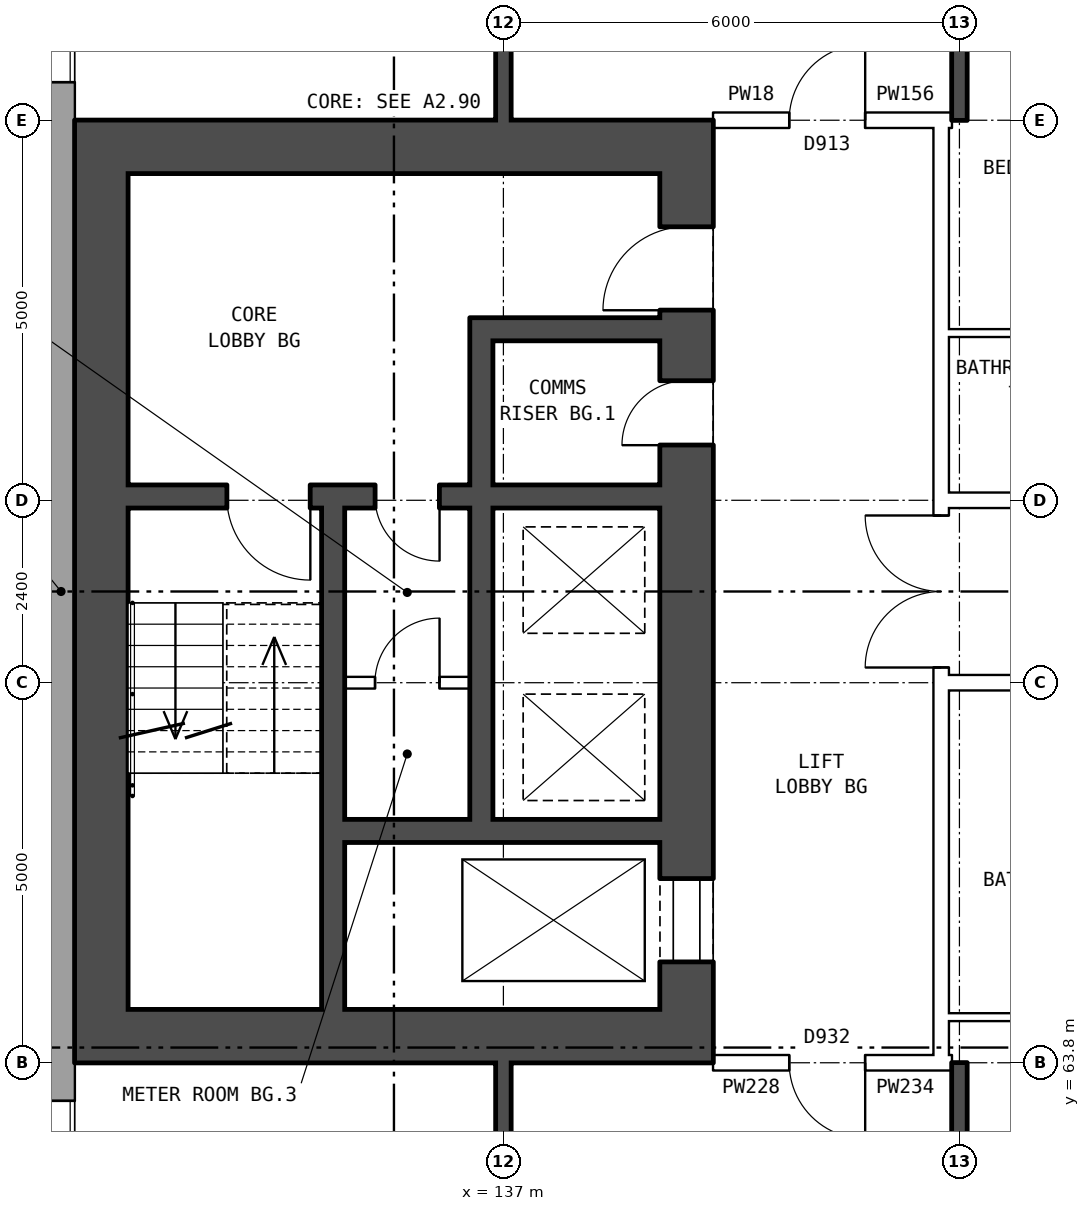
"""IFC4 building model, lengths in metres.
Left out: names, types, materials, properties, quantities, classifications, styles, units other than length and angle.
Written with IfcOpenShell. Run it as: python <this file> out.ifc"""

import sys

from ifc_helpers import new_model, si_unit, direction, frame, frame_2d, origin, place, context, subcontext, project, spatial, rectangle, extrude, element, fill, save


model = new_model("IFC4")
c1 = context("Model", 3, precision=1e-05, world=origin(), true_north=direction((0.0, 1.0)))
c2 = subcontext(c1, "Body", "Model", "MODEL_VIEW")
j1 = project(units=[si_unit("LENGTHUNIT", "METRE"), si_unit("PLANEANGLEUNIT", "RADIAN")], contexts=[c1])
p1 = place(None, origin())
s1 = spatial("IfcSite", under=j1, at=p1, CompositionType="ELEMENT")
p2 = place(p1, origin())
s2 = spatial("IfcBuilding", under=s1, at=p2, CompositionType="ELEMENT")
p3 = place(p2, frame((0.0, 0.0, 74.7)))
s3 = spatial("IfcBuildingStorey", under=s2, at=p3, CompositionType="ELEMENT", Elevation=74.7)
p4 = place(p3, frame((131.18, 82.925, 0.0), z_axis=(0.0, 0.0, 1.0), x_axis=(0.0, -1.0, 0.0)))
e1 = element("IfcWall", 1, at=p4, inside=s3, PredefinedType="STANDARD", context=c2, shape_type="SweptSolid", body=[
    extrude(rectangle(XDim=25.851, YDim=0.36, at=frame_2d((12.925, 0.0))), origin(), (0.0, 0.0, 1.0), 2.85),
])
p5 = place(p4, frame((1.625, 0.0, 0.8)))
e2 = element("IfcOpeningElement", 2, at=p5, cuts=e1, PredefinedType="OPENING", context=c2, shape_type="SweptSolid", body=[
    extrude(rectangle(XDim=1.6, YDim=1.8, at=frame_2d((0.8, 0.9))), frame((0.0, 0.19, 0.0), z_axis=(0.0, -1.0, 0.0), x_axis=(1.0, 0.0, 0.0)), (0.0, 0.0, 1.0), 0.38),
])
p6 = place(p4, frame((4.625, 0.0, 0.8)))
e3 = element("IfcOpeningElement", 3, at=p6, cuts=e1, PredefinedType="OPENING", context=c2, shape_type="SweptSolid", body=[
    extrude(rectangle(XDim=1.6, YDim=1.8, at=frame_2d((0.8, 0.9))), frame((0.0, 0.19, 0.0), z_axis=(0.0, -1.0, 0.0), x_axis=(1.0, 0.0, 0.0)), (0.0, 0.0, 1.0), 0.38),
])
p7 = place(p4, frame((19.625, 0.0, 0.8)))
e4 = element("IfcOpeningElement", 4, at=p7, cuts=e1, PredefinedType="OPENING", context=c2, shape_type="SweptSolid", body=[
    extrude(rectangle(XDim=1.6, YDim=1.8, at=frame_2d((0.8, 0.9))), frame((0.0, 0.19, 0.0), z_axis=(0.0, -1.0, 0.0), x_axis=(1.0, 0.0, 0.0)), (0.0, 0.0, 1.0), 0.38),
])
p8 = place(p4, frame((22.625, 0.0, 0.8)))
e5 = element("IfcOpeningElement", 5, at=p8, cuts=e1, PredefinedType="OPENING", context=c2, shape_type="SweptSolid", body=[
    extrude(rectangle(XDim=1.6, YDim=1.8, at=frame_2d((0.8, 0.9))), frame((0.0, 0.19, 0.0), z_axis=(0.0, -1.0, 0.0), x_axis=(1.0, 0.0, 0.0)), (0.0, 0.0, 1.0), 0.38),
])
p9 = place(p3, frame((139.41, 64.5, 0.0), z_axis=(0.0, 0.0, 1.0), x_axis=(0.0, 1.0, 0.0)))
e6 = element("IfcWall", 6, at=p9, inside=s3, PredefinedType="SHEAR", context=c2, shape_type="SweptSolid", body=[
    extrude(rectangle(XDim=11.0, YDim=0.7, at=frame_2d((5.5, 0.0))), origin(), (0.0, 0.0, 1.0), 2.85),
])
p10 = place(p9, frame((0.625, 0.0, 0.0)))
e7 = element("IfcOpeningElement", 7, at=p10, cuts=e6, PredefinedType="OPENING", context=c2, shape_type="SweptSolid", body=[
    extrude(rectangle(XDim=1.1, YDim=2.1, at=frame_2d((0.55, 1.05))), frame((0.0, 0.36, 0.0), z_axis=(0.0, -1.0, 0.0), x_axis=(1.0, 0.0, 0.0)), (0.0, 0.0, 1.0), 0.72),
])
p11 = place(p9, frame((9.2, 0.0, 0.0)))
e8 = element("IfcOpeningElement", 8, at=p11, cuts=e6, PredefinedType="OPENING", context=c2, shape_type="SweptSolid", body=[
    extrude(rectangle(XDim=1.1, YDim=2.1, at=frame_2d((0.55, 1.05))), frame((0.0, 0.36, 0.0), z_axis=(0.0, -1.0, 0.0), x_axis=(1.0, 0.0, 0.0)), (0.0, 0.0, 1.0), 0.72),
])
p12 = place(p9, frame((7.425, 0.0, 0.0)))
e9 = element("IfcOpeningElement", 9, at=p12, cuts=e6, PredefinedType="OPENING", context=c2, shape_type="SweptSolid", body=[
    extrude(rectangle(XDim=0.85, YDim=2.1, at=frame_2d((0.425, 1.05))), frame((0.0, 0.36, 0.0), z_axis=(0.0, -1.0, 0.0), x_axis=(1.0, 0.0, 0.0)), (0.0, 0.0, 1.0), 0.72),
])
p13 = place(p3, frame((131.71, 64.5, 0.0), z_axis=(0.0, 0.0, 1.0), x_axis=(0.0, 1.0, 0.0)))
e10 = element("IfcWall", 10, at=p13, inside=s3, PredefinedType="SHEAR", context=c2, shape_type="SweptSolid", body=[
    extrude(rectangle(XDim=11.0, YDim=0.7, at=frame_2d((5.5, 0.0))), origin(), (0.0, 0.0, 1.0), 2.85),
])
for number, where, z_axis, x_axis in (
    (11, (139.76, 64.15, 0.0), (0.0, 0.0, 1.0), (-1.0, 0.0, 0.0)),
    (12, (139.76, 75.85, 0.0), (0.0, 0.0, 1.0), (-1.0, 0.0, 0.0)),
):
    element("IfcWall", number, at=place(p3, frame(where, z_axis=z_axis, x_axis=x_axis)), inside=s3, PredefinedType="SHEAR", context=c2, shape_type="SweptSolid", body=[
        extrude(rectangle(XDim=8.4, YDim=0.7, at=frame_2d((4.2, 0.0))), origin(), (0.0, 0.0, 1.0), 2.85),
    ])
p14 = place(p3, frame((139.06, 66.85, 0.0), z_axis=(0.0, 0.0, 1.0), x_axis=(-1.0, 0.0, 0.0)))
e13 = element("IfcWall", 13, at=p14, inside=s3, PredefinedType="SHEAR", context=c2, shape_type="SweptSolid", body=[
    extrude(rectangle(XDim=4.15, YDim=0.3, at=frame_2d((2.075, 0.0))), origin(), (0.0, 0.0, 1.0), 2.85),
])
p15 = place(p3, frame((136.56, 68.8, 0.0), z_axis=(0.0, 0.0, 1.0), x_axis=(-1.0, 0.0, 0.0)))
e14 = element("IfcWall", 14, at=p15, inside=s3, PredefinedType="PARTITIONING", context=c2, shape_type="SweptSolid", body=[
    extrude(rectangle(XDim=1.65, YDim=0.15, at=frame_2d((0.825, 0.0))), origin(), (0.0, 0.0, 1.0), 2.85),
])
p16 = place(p15, frame((0.4, 0.0, 0.0)))
e15 = element("IfcOpeningElement", 15, at=p16, cuts=e14, PredefinedType="OPENING", context=c2, shape_type="SweptSolid", body=[
    extrude(rectangle(XDim=0.85, YDim=2.1, at=frame_2d((0.425, 1.05))), frame((0.0, 0.085, 0.0), z_axis=(0.0, -1.0, 0.0), x_axis=(1.0, 0.0, 0.0)), (0.0, 0.0, 1.0), 0.17),
])
p17 = place(p3, frame((139.06, 71.25, 0.0), z_axis=(0.0, 0.0, 1.0), x_axis=(-1.0, 0.0, 0.0)))
e16 = element("IfcWall", 16, at=p17, inside=s3, PredefinedType="SHEAR", context=c2, shape_type="SweptSolid", body=[
    extrude(rectangle(XDim=7.0, YDim=0.3, at=frame_2d((3.5, 0.0))), origin(), (0.0, 0.0, 1.0), 2.85),
])
p18 = place(p17, frame((4.6, 0.0, 0.0)))
e17 = element("IfcOpeningElement", 17, at=p18, cuts=e16, PredefinedType="OPENING", context=c2, shape_type="SweptSolid", body=[
    extrude(rectangle(XDim=1.1, YDim=2.1, at=frame_2d((0.55, 1.05))), frame((0.0, 0.16, 0.0), z_axis=(0.0, -1.0, 0.0), x_axis=(1.0, 0.0, 0.0)), (0.0, 0.0, 1.0), 0.32),
])
p19 = place(p17, frame((2.9, 0.0, 0.0)))
e18 = element("IfcOpeningElement", 18, at=p19, cuts=e16, PredefinedType="OPENING", context=c2, shape_type="SweptSolid", body=[
    extrude(rectangle(XDim=0.85, YDim=2.1, at=frame_2d((0.425, 1.05))), frame((0.0, 0.16, 0.0), z_axis=(0.0, -1.0, 0.0), x_axis=(1.0, 0.0, 0.0)), (0.0, 0.0, 1.0), 0.32),
])
p20 = place(p3, frame((139.06, 73.45, 0.0), z_axis=(0.0, 0.0, 1.0), x_axis=(-1.0, 0.0, 0.0)))
e19 = element("IfcWall", 19, at=p20, inside=s3, PredefinedType="SHEAR", context=c2, shape_type="SweptSolid", body=[
    extrude(rectangle(XDim=2.2, YDim=0.3, at=frame_2d((1.1, 0.0))), origin(), (0.0, 0.0, 1.0), 2.85),
])
p21 = place(p3, frame((136.71, 67.0, 0.0), z_axis=(0.0, 0.0, 1.0), x_axis=(0.0, 1.0, 0.0)))
e20 = element("IfcWall", 20, at=p21, inside=s3, PredefinedType="SHEAR", context=c2, shape_type="SweptSolid", body=[
    extrude(rectangle(XDim=4.1, YDim=0.3, at=frame_2d((2.05, 0.0))), origin(), (0.0, 0.0, 1.0), 2.85),
])
p22 = place(p3, frame((136.71, 71.4, 0.0), z_axis=(0.0, 0.0, 1.0), x_axis=(0.0, 1.0, 0.0)))
e21 = element("IfcWall", 21, at=p22, inside=s3, PredefinedType="SHEAR", context=c2, shape_type="SweptSolid", body=[
    extrude(rectangle(XDim=2.2, YDim=0.3, at=frame_2d((1.1, 0.0))), origin(), (0.0, 0.0, 1.0), 2.85),
])
p23 = place(p3, frame((134.76, 64.5, 0.0), z_axis=(0.0, 0.0, 1.0), x_axis=(0.0, 1.0, 0.0)))
e22 = element("IfcWall", 22, at=p23, inside=s3, PredefinedType="SHEAR", context=c2, shape_type="SweptSolid", body=[
    extrude(rectangle(XDim=6.6, YDim=0.3, at=frame_2d((3.3, 0.0))), origin(), (0.0, 0.0, 1.0), 2.85),
])
p24 = place(p3, frame((142.76, 63.9, 0.0), z_axis=(0.0, 0.0, 1.0), x_axis=(0.0, 1.0, 0.0)))
e23 = element("IfcWall", 23, at=p24, inside=s3, PredefinedType="PARTITIONING", context=c2, shape_type="SweptSolid", body=[
    extrude(rectangle(XDim=12.2, YDim=0.2, at=frame_2d((6.1, 0.0))), origin(), (0.0, 0.0, 1.0), 2.85),
])
p25 = place(p24, frame((5.1, 0.0, 0.0)))
e24 = element("IfcOpeningElement", 24, at=p25, cuts=e23, PredefinedType="OPENING", context=c2, shape_type="SweptSolid", body=[
    extrude(rectangle(XDim=2.0, YDim=2.1, at=frame_2d((1.0, 1.05))), frame((0.0, 0.11, 0.0), z_axis=(0.0, -1.0, 0.0), x_axis=(1.0, 0.0, 0.0)), (0.0, 0.0, 1.0), 0.22),
])
p26 = place(p3, frame((139.76, 63.8, 0.0), z_axis=(0.0, 0.0, 1.0), x_axis=(1.0, 0.0, 0.0)))
e25 = element("IfcWall", 25, at=p26, inside=s3, PredefinedType="PARTITIONING", context=c2, shape_type="SweptSolid", body=[
    extrude(rectangle(XDim=3.0, YDim=0.2, at=frame_2d((1.5, 0.0))), origin(), (0.0, 0.0, 1.0), 2.85),
])
p27 = place(p26, frame((1.0, 0.0, 0.0)))
e26 = element("IfcOpeningElement", 26, at=p27, cuts=e25, PredefinedType="OPENING", context=c2, shape_type="SweptSolid", body=[
    extrude(rectangle(XDim=1.0, YDim=2.1, at=frame_2d((0.5, 1.05))), frame((0.0, 0.11, 0.0), z_axis=(0.0, -1.0, 0.0), x_axis=(1.0, 0.0, 0.0)), (0.0, 0.0, 1.0), 0.22),
])
p28 = place(p3, frame((142.76, 63.8, 0.0), z_axis=(0.0, 0.0, 1.0), x_axis=(1.0, 0.0, 0.0)))
e27 = element("IfcWall", 27, at=p28, inside=s3, PredefinedType="PARTITIONING", context=c2, shape_type="SweptSolid", body=[
    extrude(rectangle(XDim=0.14, YDim=0.2, at=frame_2d((0.07, 0.0))), origin(), (0.0, 0.0, 1.0), 2.85),
])
p29 = place(p3, frame((142.76, 64.4, 0.0), z_axis=(0.0, 0.0, 1.0), x_axis=(1.0, 0.0, 0.0)))
e28 = element("IfcWall", 28, at=p29, inside=s3, PredefinedType="PARTITIONING", context=c2, shape_type="SweptSolid", body=[
    extrude(rectangle(XDim=3.24, YDim=0.1, at=frame_2d((1.62, 0.0))), origin(), (0.0, 0.0, 1.0), 2.85),
])
p30 = place(p3, frame((142.76, 68.8, 0.0), z_axis=(0.0, 0.0, 1.0), x_axis=(1.0, 0.0, 0.0)))
e29 = element("IfcWall", 29, at=p30, inside=s3, PredefinedType="PARTITIONING", context=c2, shape_type="SweptSolid", body=[
    extrude(rectangle(XDim=14.48, YDim=0.2, at=frame_2d((7.24, 0.0))), origin(), (0.0, 0.0, 1.0), 2.85),
])
p31 = place(p30, frame((4.24, 0.0, 0.0)))
e30 = element("IfcOpeningElement", 30, at=p31, cuts=e29, PredefinedType="OPENING", context=c2, shape_type="SweptSolid", body=[
    extrude(rectangle(XDim=1.0, YDim=2.1, at=frame_2d((0.5, 1.05))), frame((0.0, 0.11, 0.0), z_axis=(0.0, -1.0, 0.0), x_axis=(1.0, 0.0, 0.0)), (0.0, 0.0, 1.0), 0.22),
])
p32 = place(p30, frame((10.24, 0.0, 0.0)))
e31 = element("IfcOpeningElement", 31, at=p32, cuts=e29, PredefinedType="OPENING", context=c2, shape_type="SweptSolid", body=[
    extrude(rectangle(XDim=1.0, YDim=2.1, at=frame_2d((0.5, 1.05))), frame((0.0, 0.11, 0.0), z_axis=(0.0, -1.0, 0.0), x_axis=(1.0, 0.0, 0.0)), (0.0, 0.0, 1.0), 0.22),
])
p33 = place(p3, frame((142.76, 71.2, 0.0), z_axis=(0.0, 0.0, 1.0), x_axis=(1.0, 0.0, 0.0)))
e32 = element("IfcWall", 32, at=p33, inside=s3, PredefinedType="PARTITIONING", context=c2, shape_type="SweptSolid", body=[
    extrude(rectangle(XDim=14.48, YDim=0.2, at=frame_2d((7.24, 0.0))), origin(), (0.0, 0.0, 1.0), 2.85),
])
p34 = place(p33, frame((4.24, 0.0, 0.0)))
e33 = element("IfcOpeningElement", 33, at=p34, cuts=e32, PredefinedType="OPENING", context=c2, shape_type="SweptSolid", body=[
    extrude(rectangle(XDim=1.0, YDim=2.1, at=frame_2d((0.5, 1.05))), frame((0.0, 0.11, 0.0), z_axis=(0.0, -1.0, 0.0), x_axis=(1.0, 0.0, 0.0)), (0.0, 0.0, 1.0), 0.22),
])
p35 = place(p33, frame((7.24, 0.0, 0.0)))
e34 = element("IfcOpeningElement", 34, at=p35, cuts=e32, PredefinedType="OPENING", context=c2, shape_type="SweptSolid", body=[
    extrude(rectangle(XDim=1.0, YDim=2.1, at=frame_2d((0.5, 1.05))), frame((0.0, 0.11, 0.0), z_axis=(0.0, -1.0, 0.0), x_axis=(1.0, 0.0, 0.0)), (0.0, 0.0, 1.0), 0.22),
])
p36 = place(p3, frame((142.76, 73.4, 0.0), z_axis=(0.0, 0.0, 1.0), x_axis=(1.0, 0.0, 0.0)))
e35 = element("IfcWall", 35, at=p36, inside=s3, PredefinedType="PARTITIONING", context=c2, shape_type="SweptSolid", body=[
    extrude(rectangle(XDim=3.24, YDim=0.1, at=frame_2d((1.62, 0.0))), origin(), (0.0, 0.0, 1.0), 2.85),
])
p37 = place(p3, frame((139.76, 76.2, 0.0), z_axis=(0.0, 0.0, 1.0), x_axis=(1.0, 0.0, 0.0)))
e36 = element("IfcWall", 36, at=p37, inside=s3, PredefinedType="PARTITIONING", context=c2, shape_type="SweptSolid", body=[
    extrude(rectangle(XDim=3.0, YDim=0.2, at=frame_2d((1.5, 0.0))), origin(), (0.0, 0.0, 1.0), 2.85),
])
p38 = place(p37, frame((1.0, 0.0, 0.0)))
e37 = element("IfcOpeningElement", 37, at=p38, cuts=e36, PredefinedType="OPENING", context=c2, shape_type="SweptSolid", body=[
    extrude(rectangle(XDim=1.0, YDim=2.1, at=frame_2d((0.5, 1.05))), frame((0.0, 0.11, 0.0), z_axis=(0.0, -1.0, 0.0), x_axis=(1.0, 0.0, 0.0)), (0.0, 0.0, 1.0), 0.22),
])
p39 = place(p3, frame((142.76, 76.2, 0.0), z_axis=(0.0, 0.0, 1.0), x_axis=(1.0, 0.0, 0.0)))
e38 = element("IfcWall", 38, at=p39, inside=s3, PredefinedType="PARTITIONING", context=c2, shape_type="SweptSolid", body=[
    extrude(rectangle(XDim=0.14, YDim=0.2, at=frame_2d((0.07, 0.0))), origin(), (0.0, 0.0, 1.0), 2.85),
])
p40 = place(p3, frame((137.0, 54.36, 0.0), z_axis=(0.0, 0.0, 1.0), x_axis=(0.0, 1.0, 0.0)))
e39 = element("IfcWall", 39, at=p40, inside=s3, PredefinedType="SOLIDWALL", context=c2, shape_type="SweptSolid", body=[
    extrude(rectangle(XDim=9.44, YDim=0.2, at=frame_2d((4.72, 0.0))), origin(), (0.0, 0.0, 1.0), 2.85),
])
p41 = place(p40, frame((1.37, 0.0, 0.0)))
e40 = element("IfcOpeningElement", 40, at=p41, cuts=e39, PredefinedType="OPENING", context=c2, shape_type="SweptSolid", body=[
    extrude(rectangle(XDim=0.9, YDim=2.1, at=frame_2d((0.45, 1.05))), frame((0.0, 0.11, 0.0), z_axis=(0.0, -1.0, 0.0), x_axis=(1.0, 0.0, 0.0)), (0.0, 0.0, 1.0), 0.22),
])
p42 = place(p40, frame((7.04, 0.0, 0.0)))
e41 = element("IfcOpeningElement", 41, at=p42, cuts=e39, PredefinedType="OPENING", context=c2, shape_type="SweptSolid", body=[
    extrude(rectangle(XDim=0.9, YDim=2.1, at=frame_2d((0.45, 1.05))), frame((0.0, 0.11, 0.0), z_axis=(0.0, -1.0, 0.0), x_axis=(1.0, 0.0, 0.0)), (0.0, 0.0, 1.0), 0.22),
])
p43 = place(p3, frame((137.0, 76.2, 0.0), z_axis=(0.0, 0.0, 1.0), x_axis=(0.0, 1.0, 0.0)))
e42 = element("IfcWall", 42, at=p43, inside=s3, PredefinedType="SOLIDWALL", context=c2, shape_type="SweptSolid", body=[
    extrude(rectangle(XDim=9.44, YDim=0.2, at=frame_2d((4.72, 0.0))), origin(), (0.0, 0.0, 1.0), 2.85),
])
p44 = place(p43, frame((1.5, 0.0, 0.0)))
e43 = element("IfcOpeningElement", 43, at=p44, cuts=e42, PredefinedType="OPENING", context=c2, shape_type="SweptSolid", body=[
    extrude(rectangle(XDim=0.9, YDim=2.1, at=frame_2d((0.45, 1.05))), frame((0.0, 0.11, 0.0), z_axis=(0.0, -1.0, 0.0), x_axis=(1.0, 0.0, 0.0)), (0.0, 0.0, 1.0), 0.22),
])
for number, where, z_axis, x_axis in (
    (44, (143.0, 54.36, 0.0), (0.0, 0.0, 1.0), (0.0, 1.0, 0.0)),
    (45, (143.0, 76.2, 0.0), (0.0, 0.0, 1.0), (0.0, 1.0, 0.0)),
):
    element("IfcWall", number, at=place(p3, frame(where, z_axis=z_axis, x_axis=x_axis)), inside=s3, PredefinedType="SOLIDWALL", context=c2, shape_type="SweptSolid", body=[
        extrude(rectangle(XDim=9.44, YDim=0.2, at=frame_2d((4.72, 0.0))), origin(), (0.0, 0.0, 1.0), 2.85),
    ])
p45 = place(p6, origin())
e46 = element("IfcWindow", 46, at=p45, inside=s3, PartitioningType="SINGLE_PANEL", PredefinedType="WINDOW", context=c2, shape_type="SweptSolid", body=[
    extrude(rectangle(XDim=1.6, YDim=1.8, at=frame_2d((0.8, 0.9))), frame((0.0, 0.15, 0.0), z_axis=(0.0, -1.0, 0.0), x_axis=(1.0, 0.0, 0.0)), (0.0, 0.0, 1.0), 0.06),
])
fill(e3, e46)
p46 = place(p7, origin())
e47 = element("IfcWindow", 47, at=p46, inside=s3, PartitioningType="SINGLE_PANEL", PredefinedType="WINDOW", context=c2, shape_type="SweptSolid", body=[
    extrude(rectangle(XDim=1.6, YDim=1.8, at=frame_2d((0.8, 0.9))), frame((0.0, 0.15, 0.0), z_axis=(0.0, -1.0, 0.0), x_axis=(1.0, 0.0, 0.0)), (0.0, 0.0, 1.0), 0.06),
])
fill(e4, e47)
p47 = place(p10, origin())
e48 = element("IfcDoor", 48, at=p47, inside=s3, OperationType="DOUBLE_DOOR_SLIDING", PredefinedType="DOOR", context=c2, shape_type="SweptSolid", body=[
    extrude(rectangle(XDim=1.1, YDim=2.1, at=frame_2d((0.55, 1.05))), frame((0.0, 0.335, 0.0), z_axis=(0.0, -1.0, 0.0), x_axis=(1.0, 0.0, 0.0)), (0.0, 0.0, 1.0), 0.05),
])
fill(e7, e48)
p48 = place(p11, origin())
e49 = element("IfcDoor", 49, at=p48, inside=s3, OperationType="SINGLE_SWING_LEFT", PredefinedType="DOOR", context=c2, shape_type="SweptSolid", body=[
    extrude(rectangle(XDim=1.1, YDim=2.1, at=frame_2d((0.55, 1.05))), frame((0.0, 0.335, 0.0), z_axis=(0.0, -1.0, 0.0), x_axis=(1.0, 0.0, 0.0)), (0.0, 0.0, 1.0), 0.05),
])
fill(e8, e49)
p49 = place(p18, origin())
e50 = element("IfcDoor", 50, at=p49, inside=s3, OperationType="SINGLE_SWING_LEFT", PredefinedType="DOOR", context=c2, shape_type="SweptSolid", body=[
    extrude(rectangle(XDim=1.1, YDim=2.1, at=frame_2d((0.55, 1.05))), frame((0.0, 0.025, 0.0), z_axis=(0.0, -1.0, 0.0), x_axis=(1.0, 0.0, 0.0)), (0.0, 0.0, 1.0), 0.05),
])
fill(e17, e50)
p50 = place(p12, origin())
e51 = element("IfcDoor", 51, at=p50, inside=s3, OperationType="SINGLE_SWING_LEFT", PredefinedType="DOOR", context=c2, shape_type="SweptSolid", body=[
    extrude(rectangle(XDim=0.85, YDim=2.1, at=frame_2d((0.425, 1.05))), frame((0.0, 0.335, 0.0), z_axis=(0.0, -1.0, 0.0), x_axis=(1.0, 0.0, 0.0)), (0.0, 0.0, 1.0), 0.05),
])
fill(e9, e51)
p51 = place(p19, origin())
e52 = element("IfcDoor", 52, at=p51, inside=s3, OperationType="SINGLE_SWING_LEFT", PredefinedType="DOOR", context=c2, shape_type="SweptSolid", body=[
    extrude(rectangle(XDim=0.85, YDim=2.1, at=frame_2d((0.425, 1.05))), frame((0.0, 0.025, 0.0), z_axis=(0.0, -1.0, 0.0), x_axis=(1.0, 0.0, 0.0)), (0.0, 0.0, 1.0), 0.05),
])
fill(e18, e52)
p52 = place(p16, frame((0.85, 0.0, 0.0), z_axis=(0.0, 0.0, 1.0), x_axis=(-1.0, 0.0, 0.0)))
e53 = element("IfcDoor", 53, at=p52, inside=s3, OperationType="SINGLE_SWING_RIGHT", PredefinedType="DOOR", context=c2, shape_type="SweptSolid", body=[
    extrude(rectangle(XDim=0.85, YDim=2.1, at=frame_2d((0.425, 1.05))), frame((0.0, 0.025, 0.0), z_axis=(0.0, -1.0, 0.0), x_axis=(1.0, 0.0, 0.0)), (0.0, 0.0, 1.0), 0.05),
])
fill(e15, e53)
p53 = place(p25, origin())
e54 = element("IfcDoor", 54, at=p53, inside=s3, OperationType="DOUBLE_DOOR_SINGLE_SWING", PredefinedType="DOOR", context=c2, shape_type="SweptSolid", body=[
    extrude(rectangle(XDim=2.0, YDim=2.1, at=frame_2d((1.0, 1.05))), frame((0.0, 0.025, 0.0), z_axis=(0.0, -1.0, 0.0), x_axis=(1.0, 0.0, 0.0)), (0.0, 0.0, 1.0), 0.05),
])
fill(e24, e54)
p54 = place(p27, frame((1.0, 0.0, 0.0), z_axis=(0.0, 0.0, 1.0), x_axis=(-1.0, 0.0, 0.0)))
e55 = element("IfcDoor", 55, at=p54, inside=s3, OperationType="SINGLE_SWING_LEFT", PredefinedType="DOOR", context=c2, shape_type="SweptSolid", body=[
    extrude(rectangle(XDim=1.0, YDim=2.1, at=frame_2d((0.5, 1.05))), frame((0.0, 0.025, 0.0), z_axis=(0.0, -1.0, 0.0), x_axis=(1.0, 0.0, 0.0)), (0.0, 0.0, 1.0), 0.05),
])
fill(e26, e55)
p55 = place(p38, origin())
e56 = element("IfcDoor", 56, at=p55, inside=s3, OperationType="SINGLE_SWING_RIGHT", PredefinedType="DOOR", context=c2, shape_type="SweptSolid", body=[
    extrude(rectangle(XDim=1.0, YDim=2.1, at=frame_2d((0.5, 1.05))), frame((0.0, 0.025, 0.0), z_axis=(0.0, -1.0, 0.0), x_axis=(1.0, 0.0, 0.0)), (0.0, 0.0, 1.0), 0.05),
])
fill(e37, e56)
save(model, sys.argv[1])
